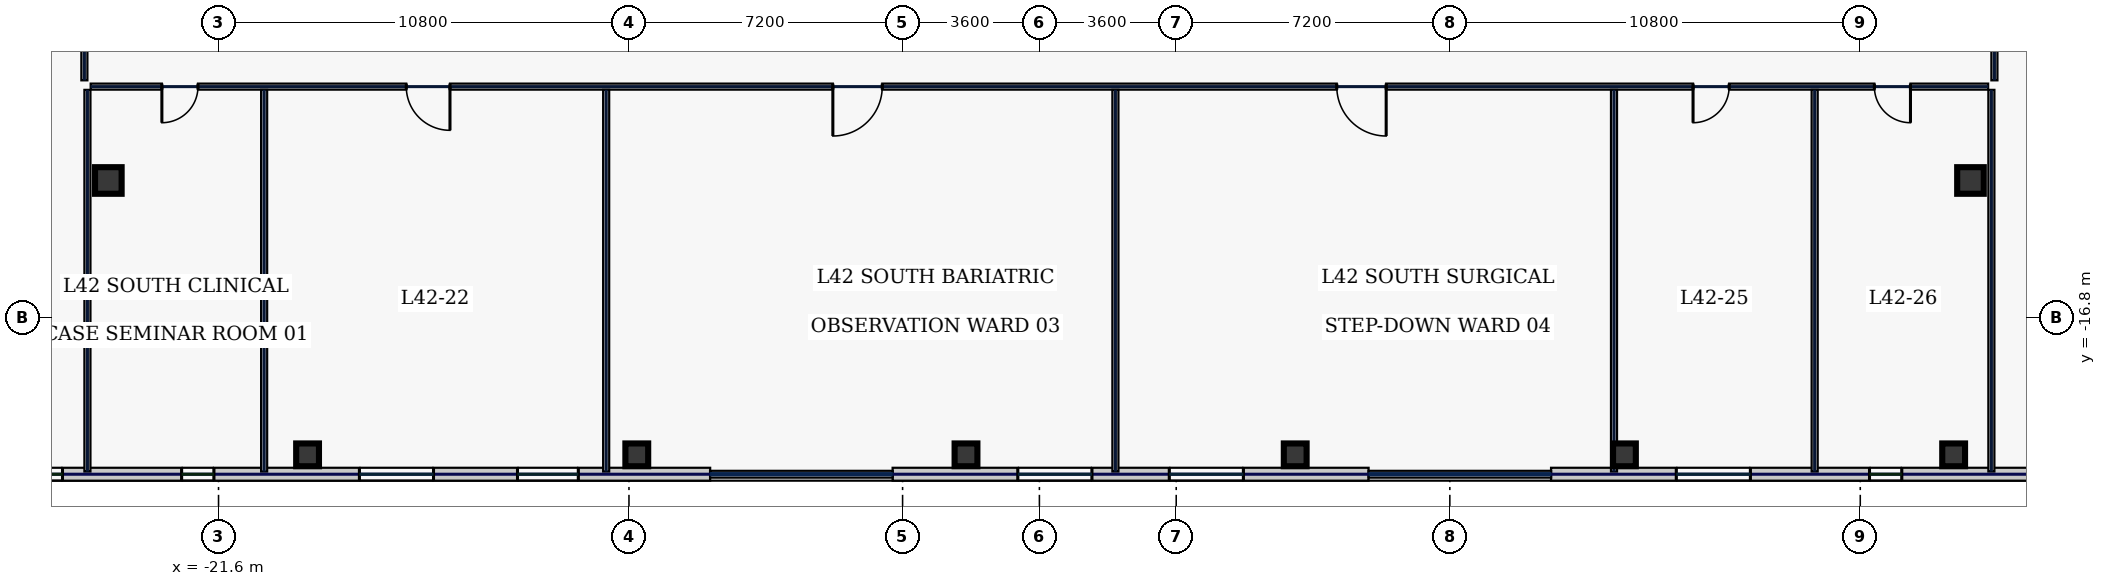
"""IFC4 building model, lengths in metres.
Left out: names, types, materials, properties, quantities, classifications, styles, units other than length and angle.
Written with IfcOpenShell. Run it as: python <this file> out.ifc"""

import sys

from ifc_helpers import new_model, si_unit, direction, frame, frame_2d, origin, origin_2d, place, context, subcontext, project, spatial, rectangle, hollow_rectangle, extrude, element, fill, save


model = new_model("IFC4")
c1 = context("Model", 3, precision=1e-05, world=origin(), true_north=direction((0.0, 1.0)))
c2 = subcontext(c1, "Body", "Model", "MODEL_VIEW")
j1 = project(units=[si_unit("LENGTHUNIT", "METRE"), si_unit("PLANEANGLEUNIT", "RADIAN")], contexts=[c1])
p1 = place(None, origin())
s1 = spatial("IfcSite", under=j1, at=p1, CompositionType="ELEMENT")
p2 = place(p1, origin())
s2 = spatial("IfcBuilding", under=s1, at=p2, CompositionType="ELEMENT")
p3 = place(p2, frame((0.0, 0.0, 184.2)))
s3 = spatial("IfcBuildingStorey", under=s2, at=p3, CompositionType="ELEMENT", Elevation=184.2)
for number, where, z_axis, x_axis in (
    (1, (-24.5, -13.2, 0.0), (0.0, 0.0, 1.0), (1.0, 0.0, 0.0)),
    (2, (24.5, -13.2, 0.0), (0.0, 0.0, 1.0), (1.0, 0.0, 0.0)),
):
    element("IfcColumn", number, at=place(p3, frame(where, z_axis=z_axis, x_axis=x_axis)), inside=s3, PredefinedType="COLUMN", context=c2, shape_type="SweptSolid", body=[
        extrude(hollow_rectangle(XDim=0.7, YDim=0.7, WallThickness=0.032, at=origin_2d()), origin(), (0.0, 0.0, 1.0), 3.74),
    ])
for number, where, z_axis, x_axis in (
    (3, (-19.257, -20.42, 0.0), (0.0, 0.0, 1.0), (1.0, 0.0, 0.0)),
    (4, (-10.594, -20.42, 0.0), (0.0, 0.0, 1.0), (1.0, 0.0, 0.0)),
    (5, (-1.931, -20.42, 0.0), (0.0, 0.0, 1.0), (1.0, 0.0, 0.0)),
    (6, (6.731, -20.42, 0.0), (0.0, 0.0, 1.0), (1.0, 0.0, 0.0)),
    (7, (15.394, -20.42, 0.0), (0.0, 0.0, 1.0), (1.0, 0.0, 0.0)),
    (8, (24.057, -20.42, 0.0), (0.0, 0.0, 1.0), (1.0, 0.0, 0.0)),
):
    element("IfcColumn", number, at=place(p3, frame(where, z_axis=z_axis, x_axis=x_axis)), inside=s3, PredefinedType="COLUMN", context=c2, shape_type="SweptSolid", body=[
        extrude(hollow_rectangle(XDim=0.6, YDim=0.6, WallThickness=0.028, at=origin_2d()), origin(), (0.0, 0.0, 1.0), 3.74),
    ])
p4 = place(p3, frame((-28.6, -20.93, 0.0), z_axis=(0.0, 0.0, 1.0), x_axis=(1.0, 0.0, 0.0)))
e9 = element("IfcWall", 9, at=p4, inside=s3, PredefinedType="STANDARD", context=c2, shape_type="SweptSolid", body=[
    extrude(rectangle(XDim=19.937, YDim=0.34, at=frame_2d((9.969, 0.0))), origin(), (0.0, 0.0, 1.0), 3.74),
])
p5 = place(p4, frame((2.044, 0.0, 0.8)))
e10 = element("IfcOpeningElement", 10, at=p5, cuts=e9, PredefinedType="OPENING", context=c2, shape_type="SweptSolid", body=[
    extrude(rectangle(XDim=0.85, YDim=1.85, at=frame_2d((0.425, 0.925))), frame((0.0, 0.18, 0.0), z_axis=(0.0, -1.0, 0.0), x_axis=(1.0, 0.0, 0.0)), (0.0, 0.0, 1.0), 0.36),
])
p6 = place(p4, frame((6.029, 0.0, 0.8)))
e11 = element("IfcOpeningElement", 11, at=p6, cuts=e9, PredefinedType="OPENING", context=c2, shape_type="SweptSolid", body=[
    extrude(rectangle(XDim=0.85, YDim=1.85, at=frame_2d((0.425, 0.925))), frame((0.0, 0.18, 0.0), z_axis=(0.0, -1.0, 0.0), x_axis=(1.0, 0.0, 0.0)), (0.0, 0.0, 1.0), 0.36),
])
p7 = place(p4, frame((10.707, 0.0, 0.8)))
e12 = element("IfcOpeningElement", 12, at=p7, cuts=e9, PredefinedType="OPENING", context=c2, shape_type="SweptSolid", body=[
    extrude(rectangle(XDim=1.95, YDim=2.1, at=frame_2d((0.975, 1.05))), frame((0.0, 0.18, 0.0), z_axis=(0.0, -1.0, 0.0), x_axis=(1.0, 0.0, 0.0)), (0.0, 0.0, 1.0), 0.36),
])
p8 = place(p4, frame((14.867, 0.0, 0.22)))
e13 = element("IfcOpeningElement", 13, at=p8, cuts=e9, PredefinedType="OPENING", context=c2, shape_type="SweptSolid", body=[
    extrude(rectangle(XDim=1.6, YDim=1.2, at=frame_2d((0.8, 0.6))), frame((0.0, 0.18, 0.0), z_axis=(0.0, -1.0, 0.0), x_axis=(1.0, 0.0, 0.0)), (0.0, 0.0, 1.0), 0.36),
])
p9 = place(p3, frame((-3.863, -20.93, 0.0), z_axis=(0.0, 0.0, 1.0), x_axis=(1.0, 0.0, 0.0)))
e14 = element("IfcWall", 14, at=p9, inside=s3, PredefinedType="STANDARD", context=c2, shape_type="SweptSolid", body=[
    extrude(rectangle(XDim=12.526, YDim=0.34, at=frame_2d((6.263, 0.0))), origin(), (0.0, 0.0, 1.0), 3.74),
])
p10 = place(p9, frame((3.295, 0.0, 0.8)))
e15 = element("IfcOpeningElement", 15, at=p10, cuts=e14, PredefinedType="OPENING", context=c2, shape_type="SweptSolid", body=[
    extrude(rectangle(XDim=1.95, YDim=2.1, at=frame_2d((0.975, 1.05))), frame((0.0, 0.18, 0.0), z_axis=(0.0, -1.0, 0.0), x_axis=(1.0, 0.0, 0.0)), (0.0, 0.0, 1.0), 0.36),
])
p11 = place(p9, frame((7.28, 0.0, 0.8)))
e16 = element("IfcOpeningElement", 16, at=p11, cuts=e14, PredefinedType="OPENING", context=c2, shape_type="SweptSolid", body=[
    extrude(rectangle(XDim=1.95, YDim=2.1, at=frame_2d((0.975, 1.05))), frame((0.0, 0.18, 0.0), z_axis=(0.0, -1.0, 0.0), x_axis=(1.0, 0.0, 0.0)), (0.0, 0.0, 1.0), 0.36),
])
p12 = place(p3, frame((13.463, -20.93, 0.0), z_axis=(0.0, 0.0, 1.0), x_axis=(1.0, 0.0, 0.0)))
e17 = element("IfcWall", 17, at=p12, inside=s3, PredefinedType="STANDARD", context=c2, shape_type="SweptSolid", body=[
    extrude(rectangle(XDim=19.937, YDim=0.34, at=frame_2d((9.969, 0.0))), origin(), (0.0, 0.0, 1.0), 3.74),
])
p13 = place(p12, frame((3.295, 0.0, 0.8)))
e18 = element("IfcOpeningElement", 18, at=p13, cuts=e17, PredefinedType="OPENING", context=c2, shape_type="SweptSolid", body=[
    extrude(rectangle(XDim=1.95, YDim=2.1, at=frame_2d((0.975, 1.05))), frame((0.0, 0.18, 0.0), z_axis=(0.0, -1.0, 0.0), x_axis=(1.0, 0.0, 0.0)), (0.0, 0.0, 1.0), 0.36),
])
p14 = place(p12, frame((8.38, 0.0, 0.8)))
e19 = element("IfcOpeningElement", 19, at=p14, cuts=e17, PredefinedType="OPENING", context=c2, shape_type="SweptSolid", body=[
    extrude(rectangle(XDim=0.85, YDim=1.85, at=frame_2d((0.425, 0.925))), frame((0.0, 0.18, 0.0), z_axis=(0.0, -1.0, 0.0), x_axis=(1.0, 0.0, 0.0)), (0.0, 0.0, 1.0), 0.36),
])
p15 = place(p12, frame((13.058, 0.0, 0.8)))
e20 = element("IfcOpeningElement", 20, at=p15, cuts=e17, PredefinedType="OPENING", context=c2, shape_type="SweptSolid", body=[
    extrude(rectangle(XDim=0.85, YDim=1.85, at=frame_2d((0.425, 0.925))), frame((0.0, 0.18, 0.0), z_axis=(0.0, -1.0, 0.0), x_axis=(1.0, 0.0, 0.0)), (0.0, 0.0, 1.0), 0.36),
])
p16 = place(p12, frame((15.943, 0.0, 0.8)))
e21 = element("IfcOpeningElement", 21, at=p16, cuts=e17, PredefinedType="OPENING", context=c2, shape_type="SweptSolid", body=[
    extrude(rectangle(XDim=1.95, YDim=2.1, at=frame_2d((0.975, 1.05))), frame((0.0, 0.18, 0.0), z_axis=(0.0, -1.0, 0.0), x_axis=(1.0, 0.0, 0.0)), (0.0, 0.0, 1.0), 0.36),
])
p17 = place(p3, frame((-25.13, -10.565, 0.0), z_axis=(0.0, 0.0, 1.0), x_axis=(0.0, 1.0, 0.0)))
e22 = element("IfcWall", 22, at=p17, inside=s3, PredefinedType="PARTITIONING", context=c2, shape_type="SweptSolid", body=[
    extrude(rectangle(XDim=2.98, YDim=0.16, at=frame_2d((1.49, 0.0))), origin(), (0.0, 0.0, 1.0), 3.74),
])
p18 = place(p17, frame((1.1, 0.0, 0.0)))
e23 = element("IfcOpeningElement", 23, at=p18, cuts=e22, PredefinedType="OPENING", context=c2, shape_type="SweptSolid", body=[
    extrude(rectangle(XDim=0.95, YDim=2.2, at=frame_2d((0.475, 1.1))), frame((0.0, 0.09, 0.0), z_axis=(0.0, -1.0, 0.0), x_axis=(1.0, 0.0, 0.0)), (0.0, 0.0, 1.0), 0.18),
])
p19 = place(p3, frame((25.13, -7.585, 0.0), z_axis=(0.0, 0.0, 1.0), x_axis=(0.0, -1.0, 0.0)))
e24 = element("IfcWall", 24, at=p19, inside=s3, PredefinedType="PARTITIONING", context=c2, shape_type="SweptSolid", body=[
    extrude(rectangle(XDim=2.98, YDim=0.16, at=frame_2d((1.49, 0.0))), origin(), (0.0, 0.0, 1.0), 3.74),
])
p20 = place(p19, frame((1.1, 0.0, 0.0)))
e25 = element("IfcOpeningElement", 25, at=p20, cuts=e24, PredefinedType="OPENING", context=c2, shape_type="SweptSolid", body=[
    extrude(rectangle(XDim=0.95, YDim=2.2, at=frame_2d((0.475, 1.1))), frame((0.0, 0.09, 0.0), z_axis=(0.0, -1.0, 0.0), x_axis=(1.0, 0.0, 0.0)), (0.0, 0.0, 1.0), 0.18),
])
p21 = place(p3, frame((24.965, -10.73, 0.0), z_axis=(0.0, 0.0, 1.0), x_axis=(-1.0, 0.0, 0.0)))
e26 = element("IfcWall", 26, at=p21, inside=s3, PredefinedType="PARTITIONING", context=c2, shape_type="SweptSolid", body=[
    extrude(rectangle(XDim=49.93, YDim=0.16, at=frame_2d((24.965, 0.0))), origin(), (0.0, 0.0, 1.0), 3.74),
])
p22 = place(p21, frame((47.106, 0.0, 0.0)))
e27 = element("IfcOpeningElement", 27, at=p22, cuts=e26, PredefinedType="OPENING", context=c2, shape_type="SweptSolid", body=[
    extrude(rectangle(XDim=0.95, YDim=2.2, at=frame_2d((0.475, 1.1))), frame((0.0, 0.09, 0.0), z_axis=(0.0, -1.0, 0.0), x_axis=(1.0, 0.0, 0.0)), (0.0, 0.0, 1.0), 0.18),
])
p23 = place(p21, frame((40.475, 0.0, 0.0)))
e28 = element("IfcOpeningElement", 28, at=p23, cuts=e26, PredefinedType="OPENING", context=c2, shape_type="SweptSolid", body=[
    extrude(rectangle(XDim=1.15, YDim=2.2, at=frame_2d((0.575, 1.1))), frame((0.0, 0.09, 0.0), z_axis=(0.0, -1.0, 0.0), x_axis=(1.0, 0.0, 0.0)), (0.0, 0.0, 1.0), 0.18),
])
p24 = place(p21, frame((29.1, 0.0, 0.0)))
e29 = element("IfcOpeningElement", 29, at=p24, cuts=e26, PredefinedType="OPENING", context=c2, shape_type="SweptSolid", body=[
    extrude(rectangle(XDim=1.3, YDim=2.2, at=frame_2d((0.65, 1.1))), frame((0.0, 0.09, 0.0), z_axis=(0.0, -1.0, 0.0), x_axis=(1.0, 0.0, 0.0)), (0.0, 0.0, 1.0), 0.18),
])
p25 = place(p21, frame((15.84, 0.0, 0.0)))
e30 = element("IfcOpeningElement", 30, at=p25, cuts=e26, PredefinedType="OPENING", context=c2, shape_type="SweptSolid", body=[
    extrude(rectangle(XDim=1.3, YDim=2.2, at=frame_2d((0.65, 1.1))), frame((0.0, 0.09, 0.0), z_axis=(0.0, -1.0, 0.0), x_axis=(1.0, 0.0, 0.0)), (0.0, 0.0, 1.0), 0.18),
])
p26 = place(p21, frame((6.815, 0.0, 0.0)))
e31 = element("IfcOpeningElement", 31, at=p26, cuts=e26, PredefinedType="OPENING", context=c2, shape_type="SweptSolid", body=[
    extrude(rectangle(XDim=0.95, YDim=2.2, at=frame_2d((0.475, 1.1))), frame((0.0, 0.09, 0.0), z_axis=(0.0, -1.0, 0.0), x_axis=(1.0, 0.0, 0.0)), (0.0, 0.0, 1.0), 0.18),
])
p27 = place(p21, frame((2.044, 0.0, 0.0)))
e32 = element("IfcOpeningElement", 32, at=p27, cuts=e26, PredefinedType="OPENING", context=c2, shape_type="SweptSolid", body=[
    extrude(rectangle(XDim=0.95, YDim=2.2, at=frame_2d((0.475, 1.1))), frame((0.0, 0.09, 0.0), z_axis=(0.0, -1.0, 0.0), x_axis=(1.0, 0.0, 0.0)), (0.0, 0.0, 1.0), 0.18),
])
for number, where, z_axis, x_axis in (
    (33, (-25.05, -20.86, 0.0), (0.0, 0.0, 1.0), (0.0, 1.0, 0.0)),
    (34, (25.05, -20.86, 0.0), (0.0, 0.0, 1.0), (0.0, 1.0, 0.0)),
    (35, (-20.4, -20.86, 0.0), (0.0, 0.0, 1.0), (0.0, 1.0, 0.0)),
    (36, (-11.4, -20.86, 0.0), (0.0, 0.0, 1.0), (0.0, 1.0, 0.0)),
    (37, (2.0, -20.86, 0.0), (0.0, 0.0, 1.0), (0.0, 1.0, 0.0)),
    (38, (15.12, -20.86, 0.0), (0.0, 0.0, 1.0), (0.0, 1.0, 0.0)),
    (39, (20.4, -20.86, 0.0), (0.0, 0.0, 1.0), (0.0, 1.0, 0.0)),
):
    element("IfcWall", number, at=place(p3, frame(where, z_axis=z_axis, x_axis=x_axis)), inside=s3, PredefinedType="PARTITIONING", context=c2, shape_type="SweptSolid", body=[
        extrude(rectangle(XDim=10.045, YDim=0.16, at=frame_2d((5.022, 0.0))), origin(), (0.0, 0.0, 1.0), 3.74),
    ])
p28 = place(p5, origin())
e40 = element("IfcWindow", 40, at=p28, inside=s3, PartitioningType="SINGLE_PANEL", PredefinedType="WINDOW", context=c2, shape_type="SweptSolid", body=[
    extrude(rectangle(XDim=0.85, YDim=1.85, at=frame_2d((0.425, 0.925))), frame((0.0, 0.03, 0.0), z_axis=(0.0, -1.0, 0.0), x_axis=(1.0, 0.0, 0.0)), (0.0, 0.0, 1.0), 0.06),
])
fill(e10, e40)
p29 = place(p6, origin())
e41 = element("IfcWindow", 41, at=p29, inside=s3, PartitioningType="SINGLE_PANEL", PredefinedType="WINDOW", context=c2, shape_type="SweptSolid", body=[
    extrude(rectangle(XDim=0.85, YDim=1.85, at=frame_2d((0.425, 0.925))), frame((0.0, 0.03, 0.0), z_axis=(0.0, -1.0, 0.0), x_axis=(1.0, 0.0, 0.0)), (0.0, 0.0, 1.0), 0.06),
])
fill(e11, e41)
p30 = place(p7, origin())
e42 = element("IfcWindow", 42, at=p30, inside=s3, PartitioningType="SINGLE_PANEL", PredefinedType="WINDOW", context=c2, shape_type="SweptSolid", body=[
    extrude(rectangle(XDim=1.95, YDim=2.1, at=frame_2d((0.975, 1.05))), frame((0.0, 0.03, 0.0), z_axis=(0.0, -1.0, 0.0), x_axis=(1.0, 0.0, 0.0)), (0.0, 0.0, 1.0), 0.06),
])
fill(e12, e42)
p31 = place(p8, origin())
e43 = element("IfcWindow", 43, at=p31, inside=s3, PartitioningType="SINGLE_PANEL", PredefinedType="WINDOW", context=c2, shape_type="SweptSolid", body=[
    extrude(rectangle(XDim=1.6, YDim=1.2, at=frame_2d((0.8, 0.6))), frame((0.0, 0.03, 0.0), z_axis=(0.0, -1.0, 0.0), x_axis=(1.0, 0.0, 0.0)), (0.0, 0.0, 1.0), 0.06),
])
fill(e13, e43)
p32 = place(p10, origin())
e44 = element("IfcWindow", 44, at=p32, inside=s3, PartitioningType="SINGLE_PANEL", PredefinedType="WINDOW", context=c2, shape_type="SweptSolid", body=[
    extrude(rectangle(XDim=1.95, YDim=2.1, at=frame_2d((0.975, 1.05))), frame((0.0, 0.03, 0.0), z_axis=(0.0, -1.0, 0.0), x_axis=(1.0, 0.0, 0.0)), (0.0, 0.0, 1.0), 0.06),
])
fill(e15, e44)
p33 = place(p11, origin())
e45 = element("IfcWindow", 45, at=p33, inside=s3, PartitioningType="SINGLE_PANEL", PredefinedType="WINDOW", context=c2, shape_type="SweptSolid", body=[
    extrude(rectangle(XDim=1.95, YDim=2.1, at=frame_2d((0.975, 1.05))), frame((0.0, 0.03, 0.0), z_axis=(0.0, -1.0, 0.0), x_axis=(1.0, 0.0, 0.0)), (0.0, 0.0, 1.0), 0.06),
])
fill(e16, e45)
p34 = place(p13, origin())
e46 = element("IfcWindow", 46, at=p34, inside=s3, PartitioningType="SINGLE_PANEL", PredefinedType="WINDOW", context=c2, shape_type="SweptSolid", body=[
    extrude(rectangle(XDim=1.95, YDim=2.1, at=frame_2d((0.975, 1.05))), frame((0.0, 0.03, 0.0), z_axis=(0.0, -1.0, 0.0), x_axis=(1.0, 0.0, 0.0)), (0.0, 0.0, 1.0), 0.06),
])
fill(e18, e46)
p35 = place(p14, origin())
e47 = element("IfcWindow", 47, at=p35, inside=s3, PartitioningType="SINGLE_PANEL", PredefinedType="WINDOW", context=c2, shape_type="SweptSolid", body=[
    extrude(rectangle(XDim=0.85, YDim=1.85, at=frame_2d((0.425, 0.925))), frame((0.0, 0.03, 0.0), z_axis=(0.0, -1.0, 0.0), x_axis=(1.0, 0.0, 0.0)), (0.0, 0.0, 1.0), 0.06),
])
fill(e19, e47)
p36 = place(p22, origin())
e48 = element("IfcDoor", 48, at=p36, inside=s3, OperationType="SINGLE_SWING_RIGHT", PredefinedType="DOOR", context=c2, shape_type="SweptSolid", body=[
    extrude(rectangle(XDim=0.95, YDim=2.2, at=frame_2d((0.475, 1.1))), frame((0.0, 0.025, 0.0), z_axis=(0.0, -1.0, 0.0), x_axis=(1.0, 0.0, 0.0)), (0.0, 0.0, 1.0), 0.05),
])
fill(e27, e48)
p37 = place(p23, origin())
e49 = element("IfcDoor", 49, at=p37, inside=s3, OperationType="SINGLE_SWING_LEFT", PredefinedType="DOOR", context=c2, shape_type="SweptSolid", body=[
    extrude(rectangle(XDim=1.15, YDim=2.2, at=frame_2d((0.575, 1.1))), frame((0.0, 0.025, 0.0), z_axis=(0.0, -1.0, 0.0), x_axis=(1.0, 0.0, 0.0)), (0.0, 0.0, 1.0), 0.05),
])
fill(e28, e49)
p38 = place(p24, origin())
e50 = element("IfcDoor", 50, at=p38, inside=s3, OperationType="SINGLE_SWING_RIGHT", PredefinedType="DOOR", context=c2, shape_type="SweptSolid", body=[
    extrude(rectangle(XDim=1.3, YDim=2.2, at=frame_2d((0.65, 1.1))), frame((0.0, 0.025, 0.0), z_axis=(0.0, -1.0, 0.0), x_axis=(1.0, 0.0, 0.0)), (0.0, 0.0, 1.0), 0.05),
])
fill(e29, e50)
p39 = place(p25, origin())
e51 = element("IfcDoor", 51, at=p39, inside=s3, OperationType="SINGLE_SWING_LEFT", PredefinedType="DOOR", context=c2, shape_type="SweptSolid", body=[
    extrude(rectangle(XDim=1.3, YDim=2.2, at=frame_2d((0.65, 1.1))), frame((0.0, 0.025, 0.0), z_axis=(0.0, -1.0, 0.0), x_axis=(1.0, 0.0, 0.0)), (0.0, 0.0, 1.0), 0.05),
])
fill(e30, e51)
p40 = place(p26, origin())
e52 = element("IfcDoor", 52, at=p40, inside=s3, OperationType="SINGLE_SWING_RIGHT", PredefinedType="DOOR", context=c2, shape_type="SweptSolid", body=[
    extrude(rectangle(XDim=0.95, YDim=2.2, at=frame_2d((0.475, 1.1))), frame((0.0, 0.025, 0.0), z_axis=(0.0, -1.0, 0.0), x_axis=(1.0, 0.0, 0.0)), (0.0, 0.0, 1.0), 0.05),
])
fill(e31, e52)
p41 = place(p27, origin())
e53 = element("IfcDoor", 53, at=p41, inside=s3, OperationType="SINGLE_SWING_LEFT", PredefinedType="DOOR", context=c2, shape_type="SweptSolid", body=[
    extrude(rectangle(XDim=0.95, YDim=2.2, at=frame_2d((0.475, 1.1))), frame((0.0, 0.025, 0.0), z_axis=(0.0, -1.0, 0.0), x_axis=(1.0, 0.0, 0.0)), (0.0, 0.0, 1.0), 0.05),
])
fill(e32, e53)
save(model, sys.argv[1])
